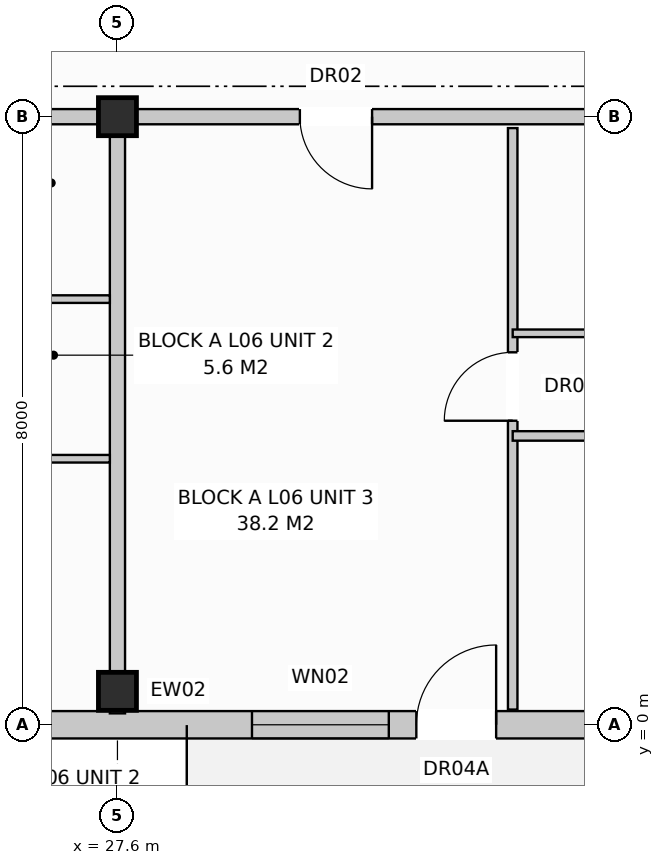
"""IFC4 building model, lengths in metres.
Left out: names, types, materials, properties, quantities, classifications, styles, units other than length and angle.
Written with IfcOpenShell. Run it as: python <this file> out.ifc"""

import sys

from ifc_helpers import new_model, si_unit, direction, frame, frame_2d, origin, origin_with_axes, origin_2d, place, context, subcontext, project, spatial, rectangle, extrude, element, fill, save


model = new_model("IFC4")
c1 = context("Model", 3, precision=1e-05, world=origin(), true_north=direction((0.0, 1.0)))
c2 = subcontext(c1, "Body", "Model", "MODEL_VIEW")
j1 = project(units=[si_unit("LENGTHUNIT", "METRE"), si_unit("PLANEANGLEUNIT", "RADIAN")], contexts=[c1])
p1 = place(None, origin())
s1 = spatial("IfcSite", under=j1, at=p1, CompositionType="ELEMENT")
p2 = place(p1, origin())
s2 = spatial("IfcBuilding", under=s1, at=p2, CompositionType="ELEMENT")
p3 = place(p2, frame((0.0, 0.0, 20.8)))
s3 = spatial("IfcBuildingStorey", under=s2, at=p3, CompositionType="ELEMENT", Elevation=20.8)
for number, where, z_axis, x_axis in (
    (1, (27.6, 0.44, 0.0), (0.0, 0.0, 1.0), (1.0, 0.0, 0.0)),
    (2, (27.6, 8.0, 0.0), (0.0, 0.0, 1.0), (1.0, 0.0, 0.0)),
):
    element("IfcColumn", number, at=place(p3, frame(where, z_axis=z_axis, x_axis=x_axis)), inside=s3, PredefinedType="COLUMN", context=c2, shape_type="SweptSolid", body=[
        extrude(rectangle(XDim=0.5, YDim=0.5, at=origin_2d()), origin(), (0.0, 0.0, 1.0), 3.2),
    ])
p4 = place(p3, frame((0.17, 0.0, 0.0), z_axis=(0.0, 0.0, 1.0), x_axis=(1.0, 0.0, 0.0)))
e3 = element("IfcWall", 3, at=p4, inside=s3, PredefinedType="STANDARD", context=c2, shape_type="SweptSolid", body=[
    extrude(rectangle(XDim=54.86, YDim=0.36, at=frame_2d((27.43, 0.0))), origin(), (0.0, 0.0, 1.0), 2.95),
])
p5 = place(p4, frame((4.862, 0.0, 0.0)))
e4 = element("IfcOpeningElement", 4, at=p5, cuts=e3, PredefinedType="OPENING", context=c2, shape_type="SweptSolid", body=[
    extrude(rectangle(XDim=1.05, YDim=2.12, at=frame_2d((0.525, 1.06))), frame((0.0, 0.192, 0.0), z_axis=(0.0, -1.0, 0.0), x_axis=(1.0, 0.0, 0.0)), (0.0, 0.0, 1.0), 0.384),
])
p6 = place(p4, frame((15.262, 0.0, 0.0)))
e5 = element("IfcOpeningElement", 5, at=p6, cuts=e3, PredefinedType="OPENING", context=c2, shape_type="SweptSolid", body=[
    extrude(rectangle(XDim=1.05, YDim=2.12, at=frame_2d((0.525, 1.06))), frame((0.0, 0.192, 0.0), z_axis=(0.0, -1.0, 0.0), x_axis=(1.0, 0.0, 0.0)), (0.0, 0.0, 1.0), 0.384),
])
p7 = place(p4, frame((31.362, 0.0, 0.0)))
e6 = element("IfcOpeningElement", 6, at=p7, cuts=e3, PredefinedType="OPENING", context=c2, shape_type="SweptSolid", body=[
    extrude(rectangle(XDim=1.05, YDim=2.12, at=frame_2d((0.525, 1.06))), frame((0.0, 0.192, 0.0), z_axis=(0.0, -1.0, 0.0), x_axis=(1.0, 0.0, 0.0)), (0.0, 0.0, 1.0), 0.384),
])
p8 = place(p4, frame((44.235, 0.0, 0.0)))
e7 = element("IfcOpeningElement", 7, at=p8, cuts=e3, PredefinedType="OPENING", context=c2, shape_type="SweptSolid", body=[
    extrude(rectangle(XDim=1.05, YDim=2.12, at=frame_2d((0.525, 1.06))), frame((0.0, 0.192, 0.0), z_axis=(0.0, -1.0, 0.0), x_axis=(1.0, 0.0, 0.0)), (0.0, 0.0, 1.0), 0.384),
])
p9 = place(p4, frame((2.1, 0.0, 0.8)))
e8 = element("IfcOpeningElement", 8, at=p9, cuts=e3, PredefinedType="OPENING", context=c2, shape_type="SweptSolid", body=[
    extrude(rectangle(XDim=1.8, YDim=1.7, at=frame_2d((0.9, 0.85))), frame((0.0, 0.192, 0.0), z_axis=(0.0, -1.0, 0.0), x_axis=(1.0, 0.0, 0.0)), (0.0, 0.0, 1.0), 0.384),
])
p10 = place(p4, frame((7.75, 0.0, 0.72)))
e9 = element("IfcOpeningElement", 9, at=p10, cuts=e3, PredefinedType="OPENING", context=c2, shape_type="SweptSolid", body=[
    extrude(rectangle(XDim=1.9, YDim=1.85, at=frame_2d((0.95, 0.925))), frame((0.0, 0.192, 0.0), z_axis=(0.0, -1.0, 0.0), x_axis=(1.0, 0.0, 0.0)), (0.0, 0.0, 1.0), 0.384),
])
p11 = place(p4, frame((11.8, 0.0, 0.72)))
e10 = element("IfcOpeningElement", 10, at=p11, cuts=e3, PredefinedType="OPENING", context=c2, shape_type="SweptSolid", body=[
    extrude(rectangle(XDim=1.1, YDim=1.5, at=frame_2d((0.55, 0.75))), frame((0.0, 0.192, 0.0), z_axis=(0.0, -1.0, 0.0), x_axis=(1.0, 0.0, 0.0)), (0.0, 0.0, 1.0), 0.384),
])
p12 = place(p4, frame((17.6, 0.0, 0.8)))
e11 = element("IfcOpeningElement", 11, at=p12, cuts=e3, PredefinedType="OPENING", context=c2, shape_type="SweptSolid", body=[
    extrude(rectangle(XDim=1.8, YDim=1.7, at=frame_2d((0.9, 0.85))), frame((0.0, 0.192, 0.0), z_axis=(0.0, -1.0, 0.0), x_axis=(1.0, 0.0, 0.0)), (0.0, 0.0, 1.0), 0.384),
])
p13 = place(p4, frame((21.55, 0.0, 0.72)))
e12 = element("IfcOpeningElement", 12, at=p13, cuts=e3, PredefinedType="OPENING", context=c2, shape_type="SweptSolid", body=[
    extrude(rectangle(XDim=1.9, YDim=1.85, at=frame_2d((0.95, 0.925))), frame((0.0, 0.192, 0.0), z_axis=(0.0, -1.0, 0.0), x_axis=(1.0, 0.0, 0.0)), (0.0, 0.0, 1.0), 0.384),
])
p14 = place(p4, frame((25.35, 0.0, 0.72)))
e13 = element("IfcOpeningElement", 13, at=p14, cuts=e3, PredefinedType="OPENING", context=c2, shape_type="SweptSolid", body=[
    extrude(rectangle(XDim=1.1, YDim=1.5, at=frame_2d((0.55, 0.75))), frame((0.0, 0.192, 0.0), z_axis=(0.0, -1.0, 0.0), x_axis=(1.0, 0.0, 0.0)), (0.0, 0.0, 1.0), 0.384),
])
p15 = place(p4, frame((29.2, 0.0, 0.8)))
e14 = element("IfcOpeningElement", 14, at=p15, cuts=e3, PredefinedType="OPENING", context=c2, shape_type="SweptSolid", body=[
    extrude(rectangle(XDim=1.8, YDim=1.7, at=frame_2d((0.9, 0.85))), frame((0.0, 0.192, 0.0), z_axis=(0.0, -1.0, 0.0), x_axis=(1.0, 0.0, 0.0)), (0.0, 0.0, 1.0), 0.384),
])
p16 = place(p4, frame((34.833, 0.0, 0.72)))
e15 = element("IfcOpeningElement", 15, at=p16, cuts=e3, PredefinedType="OPENING", context=c2, shape_type="SweptSolid", body=[
    extrude(rectangle(XDim=1.9, YDim=1.85, at=frame_2d((0.95, 0.925))), frame((0.0, 0.192, 0.0), z_axis=(0.0, -1.0, 0.0), x_axis=(1.0, 0.0, 0.0)), (0.0, 0.0, 1.0), 0.384),
])
p17 = place(p4, frame((38.025, 0.0, 0.8)))
e16 = element("IfcOpeningElement", 16, at=p17, cuts=e3, PredefinedType="OPENING", context=c2, shape_type="SweptSolid", body=[
    extrude(rectangle(XDim=1.95, YDim=1.65, at=frame_2d((0.975, 0.825))), frame((0.0, 0.192, 0.0), z_axis=(0.0, -1.0, 0.0), x_axis=(1.0, 0.0, 0.0)), (0.0, 0.0, 1.0), 0.384),
])
p18 = place(p4, frame((42.1, 0.0, 0.8)))
e17 = element("IfcOpeningElement", 17, at=p18, cuts=e3, PredefinedType="OPENING", context=c2, shape_type="SweptSolid", body=[
    extrude(rectangle(XDim=1.8, YDim=1.7, at=frame_2d((0.9, 0.85))), frame((0.0, 0.192, 0.0), z_axis=(0.0, -1.0, 0.0), x_axis=(1.0, 0.0, 0.0)), (0.0, 0.0, 1.0), 0.384),
])
p19 = place(p4, frame((45.75, 0.0, 0.72)))
e18 = element("IfcOpeningElement", 18, at=p19, cuts=e3, PredefinedType="OPENING", context=c2, shape_type="SweptSolid", body=[
    extrude(rectangle(XDim=1.9, YDim=1.85, at=frame_2d((0.95, 0.925))), frame((0.0, 0.192, 0.0), z_axis=(0.0, -1.0, 0.0), x_axis=(1.0, 0.0, 0.0)), (0.0, 0.0, 1.0), 0.384),
])
p20 = place(p4, frame((49.125, 0.0, 0.8)))
e19 = element("IfcOpeningElement", 19, at=p20, cuts=e3, PredefinedType="OPENING", context=c2, shape_type="SweptSolid", body=[
    extrude(rectangle(XDim=1.95, YDim=1.65, at=frame_2d((0.975, 0.825))), frame((0.0, 0.192, 0.0), z_axis=(0.0, -1.0, 0.0), x_axis=(1.0, 0.0, 0.0)), (0.0, 0.0, 1.0), 0.384),
])
p21 = place(p4, frame((52.415, 0.0, 0.8)))
e20 = element("IfcOpeningElement", 20, at=p21, cuts=e3, PredefinedType="OPENING", context=c2, shape_type="SweptSolid", body=[
    extrude(rectangle(XDim=1.8, YDim=1.7, at=frame_2d((0.9, 0.85))), frame((0.0, 0.192, 0.0), z_axis=(0.0, -1.0, 0.0), x_axis=(1.0, 0.0, 0.0)), (0.0, 0.0, 1.0), 0.384),
])
p22 = place(p3, frame((27.6, 7.85, 0.0), z_axis=(0.0, 0.0, 1.0), x_axis=(0.0, -1.0, 0.0)))
e21 = element("IfcWall", 21, at=p22, inside=s3, PredefinedType="PARTITIONING", context=c2, shape_type="SweptSolid", body=[
    extrude(rectangle(XDim=7.7, YDim=0.2, at=frame_2d((3.85, 0.0))), origin(), (0.0, 0.0, 1.0), 2.95),
])
p23 = place(p3, frame((20.7, 8.0, 0.0), z_axis=(0.0, 0.0, 1.0), x_axis=(1.0, 0.0, 0.0)))
e22 = element("IfcWall", 22, at=p23, inside=s3, PredefinedType="PARTITIONING", context=c2, shape_type="SweptSolid", body=[
    extrude(rectangle(XDim=6.9, YDim=0.2, at=frame_2d((3.45, 0.0))), origin(), (0.0, 0.0, 1.0), 2.39),
])
p24 = place(p23, frame((2.0, 0.0, 0.0)))
e23 = element("IfcOpeningElement", 23, at=p24, cuts=e22, PredefinedType="OPENING", context=c2, shape_type="SweptSolid", body=[
    extrude(rectangle(XDim=0.95, YDim=2.15, at=frame_2d((0.475, 1.075))), frame((0.0, 0.112, 0.0), z_axis=(0.0, -1.0, 0.0), x_axis=(1.0, 0.0, 0.0)), (0.0, 0.0, 1.0), 0.224),
])
for number, where, z_axis, x_axis in (
    (24, (24.6, 5.6, 0.0), (0.0, 0.0, 1.0), (1.0, 0.0, 0.0)),
    (25, (24.6, 3.5, 0.0), (0.0, 0.0, 1.0), (1.0, 0.0, 0.0)),
):
    element("IfcWall", number, at=place(p3, frame(where, z_axis=z_axis, x_axis=x_axis)), inside=s3, PredefinedType="PARTITIONING", context=c2, shape_type="SweptSolid", body=[
        extrude(rectangle(XDim=2.9, YDim=0.1, at=frame_2d((1.45, 0.0))), origin(), (0.0, 0.0, 1.0), 2.95),
    ])
p25 = place(p3, frame((27.6, 8.0, 0.0), z_axis=(0.0, 0.0, 1.0), x_axis=(1.0, 0.0, 0.0)))
e26 = element("IfcWall", 26, at=p25, inside=s3, PredefinedType="PARTITIONING", context=c2, shape_type="SweptSolid", body=[
    extrude(rectangle(XDim=13.8, YDim=0.2, at=frame_2d((6.9, 0.0))), origin(), (0.0, 0.0, 1.0), 2.39),
])
p26 = place(p25, frame((2.4, 0.0, 0.0)))
e27 = element("IfcOpeningElement", 27, at=p26, cuts=e26, PredefinedType="OPENING", context=c2, shape_type="SweptSolid", body=[
    extrude(rectangle(XDim=0.95, YDim=2.15, at=frame_2d((0.475, 1.075))), frame((0.0, 0.112, 0.0), z_axis=(0.0, -1.0, 0.0), x_axis=(1.0, 0.0, 0.0)), (0.0, 0.0, 1.0), 0.224),
])
p27 = place(p3, frame((32.8, 7.85, 0.0), z_axis=(0.0, 0.0, 1.0), x_axis=(0.0, -1.0, 0.0)))
e28 = element("IfcWall", 28, at=p27, inside=s3, PredefinedType="PARTITIONING", context=c2, shape_type="SweptSolid", body=[
    extrude(rectangle(XDim=7.65, YDim=0.125, at=frame_2d((3.825, 0.0))), origin(), (0.0, 0.0, 1.0), 2.95),
])
p28 = place(p27, frame((2.95, 0.0, 0.0)))
e29 = element("IfcOpeningElement", 29, at=p28, cuts=e28, PredefinedType="OPENING", context=c2, shape_type="SweptSolid", body=[
    extrude(rectangle(XDim=0.9, YDim=2.1, at=frame_2d((0.45, 1.05))), frame((0.0, 0.074, 0.0), z_axis=(0.0, -1.0, 0.0), x_axis=(1.0, 0.0, 0.0)), (0.0, 0.0, 1.0), 0.149),
])
p29 = place(p3, frame((32.8, 5.15, 0.0), z_axis=(0.0, 0.0, 1.0), x_axis=(1.0, 0.0, 0.0)))
e30 = element("IfcWall", 30, at=p29, inside=s3, PredefinedType="PARTITIONING", context=c2, shape_type="SweptSolid", body=[
    extrude(rectangle(XDim=8.5, YDim=0.1, at=frame_2d((4.25, 0.0))), origin(), (0.0, 0.0, 1.0), 2.95),
])
p30 = place(p29, frame((1.0, 0.0, 0.0)))
e31 = element("IfcOpeningElement", 31, at=p30, cuts=e30, PredefinedType="OPENING", context=c2, shape_type="SweptSolid", body=[
    extrude(rectangle(XDim=0.85, YDim=2.1, at=frame_2d((0.425, 1.05))), frame((0.0, 0.062, 0.0), z_axis=(0.0, -1.0, 0.0), x_axis=(1.0, 0.0, 0.0)), (0.0, 0.0, 1.0), 0.124),
])
p31 = place(p29, frame((3.4, 0.0, 0.0)))
e32 = element("IfcOpeningElement", 32, at=p31, cuts=e30, PredefinedType="OPENING", context=c2, shape_type="SweptSolid", body=[
    extrude(rectangle(XDim=0.85, YDim=2.05, at=frame_2d((0.425, 1.025))), frame((0.0, 0.062, 0.0), z_axis=(0.0, -1.0, 0.0), x_axis=(1.0, 0.0, 0.0)), (0.0, 0.0, 1.0), 0.124),
])
p32 = place(p29, frame((6.2, 0.0, 0.0)))
e33 = element("IfcOpeningElement", 33, at=p32, cuts=e30, PredefinedType="OPENING", context=c2, shape_type="SweptSolid", body=[
    extrude(rectangle(XDim=0.85, YDim=2.05, at=frame_2d((0.425, 1.025))), frame((0.0, 0.062, 0.0), z_axis=(0.0, -1.0, 0.0), x_axis=(1.0, 0.0, 0.0)), (0.0, 0.0, 1.0), 0.124),
])
p33 = place(p3, frame((32.8, 3.8, 0.0), z_axis=(0.0, 0.0, 1.0), x_axis=(1.0, 0.0, 0.0)))
e34 = element("IfcWall", 34, at=p33, inside=s3, PredefinedType="PARTITIONING", context=c2, shape_type="SweptSolid", body=[
    extrude(rectangle(XDim=8.5, YDim=0.125, at=frame_2d((4.25, 0.0))), origin(), (0.0, 0.0, 1.0), 2.95),
])
p34 = place(p33, frame((1.5, 0.0, 0.0)))
e35 = element("IfcOpeningElement", 35, at=p34, cuts=e34, PredefinedType="OPENING", context=c2, shape_type="SweptSolid", body=[
    extrude(rectangle(XDim=0.9, YDim=2.1, at=frame_2d((0.45, 1.05))), frame((0.0, 0.074, 0.0), z_axis=(0.0, -1.0, 0.0), x_axis=(1.0, 0.0, 0.0)), (0.0, 0.0, 1.0), 0.149),
])
p35 = place(p33, frame((5.6, 0.0, 0.0)))
e36 = element("IfcOpeningElement", 36, at=p35, cuts=e34, PredefinedType="OPENING", context=c2, shape_type="SweptSolid", body=[
    extrude(rectangle(XDim=0.9, YDim=2.1, at=frame_2d((0.45, 1.05))), frame((0.0, 0.074, 0.0), z_axis=(0.0, -1.0, 0.0), x_axis=(1.0, 0.0, 0.0)), (0.0, 0.0, 1.0), 0.149),
])
p36 = place(p7, origin_with_axes())
e37 = element("IfcDoor", 37, at=p36, inside=s3, OperationType="SINGLE_SWING_RIGHT", PredefinedType="DOOR", context=c2, shape_type="SweptSolid", body=[
    extrude(rectangle(XDim=1.05, YDim=2.12, at=frame_2d((0.525, 1.06))), frame((0.0, 0.025, 0.0), z_axis=(0.0, -1.0, 0.0), x_axis=(1.0, 0.0, 0.0)), (0.0, 0.0, 1.0), 0.05),
])
fill(e6, e37)
p37 = place(p15, origin_with_axes())
e38 = element("IfcWindow", 38, at=p37, inside=s3, PartitioningType="SINGLE_PANEL", PredefinedType="WINDOW", context=c2, shape_type="SweptSolid", body=[
    extrude(rectangle(XDim=1.8, YDim=1.7, at=frame_2d((0.9, 0.85))), frame((0.0, 0.03, 0.0), z_axis=(0.0, -1.0, 0.0), x_axis=(1.0, 0.0, 0.0)), (0.0, 0.0, 1.0), 0.06),
])
fill(e14, e38)
p38 = place(p26, frame((0.95, 0.0, 0.0), z_axis=(0.0, 0.0, 1.0), x_axis=(-1.0, 0.0, 0.0)))
e39 = element("IfcDoor", 39, at=p38, inside=s3, OperationType="SINGLE_SWING_RIGHT", PredefinedType="DOOR", context=c2, shape_type="SweptSolid", body=[
    extrude(rectangle(XDim=0.95, YDim=2.15, at=frame_2d((0.475, 1.075))), frame((0.0, 0.025, 0.0), z_axis=(0.0, -1.0, 0.0), x_axis=(1.0, 0.0, 0.0)), (0.0, 0.0, 1.0), 0.05),
])
fill(e27, e39)
p39 = place(p28, frame((0.9, 0.0, 0.0), z_axis=(0.0, 0.0, 1.0), x_axis=(-1.0, 0.0, 0.0)))
e40 = element("IfcDoor", 40, at=p39, inside=s3, OperationType="SINGLE_SWING_RIGHT", PredefinedType="DOOR", context=c2, shape_type="SweptSolid", body=[
    extrude(rectangle(XDim=0.9, YDim=2.1, at=frame_2d((0.45, 1.05))), frame((0.0, 0.025, 0.0), z_axis=(0.0, -1.0, 0.0), x_axis=(1.0, 0.0, 0.0)), (0.0, 0.0, 1.0), 0.05),
])
fill(e29, e40)
save(model, sys.argv[1])
